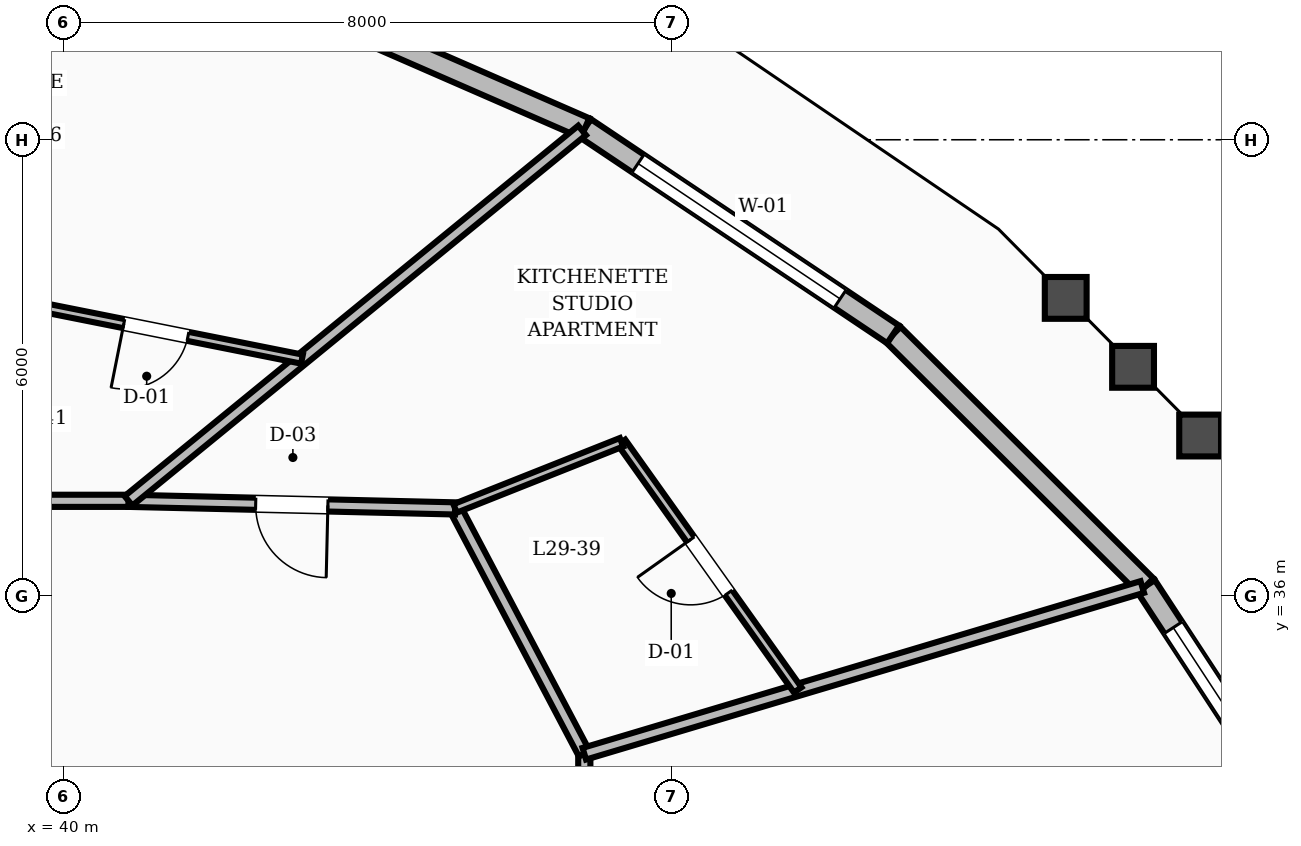
"""IFC4 building model, lengths in metres.
Left out: names, types, materials, properties, quantities, classifications, styles, units other than length and angle.
Written with IfcOpenShell. Run it as: python <this file> out.ifc"""

import sys

from ifc_helpers import new_model, si_unit, direction, frame, frame_2d, origin, place, context, subcontext, project, spatial, rectangle, extrude, element, fill, save


model = new_model("IFC4")
c1 = context("Model", 3, precision=1e-05, world=origin(), true_north=direction((0.0, 1.0)))
c2 = subcontext(c1, "Body", "Model", "MODEL_VIEW")
j1 = project(units=[si_unit("LENGTHUNIT", "METRE"), si_unit("PLANEANGLEUNIT", "RADIAN")], contexts=[c1])
p1 = place(None, origin())
s1 = spatial("IfcSite", under=j1, at=p1, CompositionType="ELEMENT")
p2 = place(p1, origin())
s2 = spatial("IfcBuilding", under=s1, at=p2, CompositionType="ELEMENT")
p3 = place(p2, frame((0.0, 0.0, 117.2)))
s3 = spatial("IfcBuildingStorey", under=s2, at=p3, CompositionType="ELEMENT", Elevation=117.2)
p4 = place(p3, frame((56.71, 32.356, 0.0), z_axis=(0.0, 0.0, 1.0), x_axis=(-0.547750773174, 0.836641554363, 0.0)))
e1 = element("IfcWall", 1, at=p4, inside=s3, PredefinedType="STANDARD", context=c2, shape_type="SweptSolid", body=[
    extrude(rectangle(XDim=4.512, YDim=0.28, at=frame_2d((2.256, 0.0))), origin(), (0.0, 0.0, 1.0), 2.82),
])
p5 = place(p4, frame((0.656, 0.0, 0.8)))
e2 = element("IfcOpeningElement", 2, at=p5, cuts=e1, PredefinedType="OPENING", context=c2, shape_type="SweptSolid", body=[
    extrude(rectangle(XDim=3.2, YDim=1.65, at=frame_2d((1.6, 0.825))), frame((0.0, 0.15, 0.0), z_axis=(0.0, -1.0, 0.0), x_axis=(1.0, 0.0, 0.0)), (0.0, 0.0, 1.0), 0.3),
])
p6 = place(p3, frame((54.239, 36.131, 0.0), z_axis=(0.0, 0.0, 1.0), x_axis=(-0.708977561681, 0.705231038052, 0.0)))
e3 = element("IfcWall", 3, at=p6, inside=s3, PredefinedType="STANDARD", context=c2, shape_type="SweptSolid", body=[
    extrude(rectangle(XDim=4.692, YDim=0.28, at=frame_2d((2.346, 0.0))), origin(), (0.0, 0.0, 1.0), 2.82),
])
p7 = place(p3, frame((50.913, 39.439, 0.0), z_axis=(0.0, 0.0, 1.0), x_axis=(-0.830785482437, 0.556592743549, 0.0)))
e4 = element("IfcWall", 4, at=p7, inside=s3, PredefinedType="STANDARD", context=c2, shape_type="SweptSolid", body=[
    extrude(rectangle(XDim=4.878, YDim=0.28, at=frame_2d((2.439, 0.0))), origin(), (0.0, 0.0, 1.0), 2.82),
])
p8 = place(p7, frame((0.839, 0.0, 0.8)))
e5 = element("IfcOpeningElement", 5, at=p8, cuts=e4, PredefinedType="OPENING", context=c2, shape_type="SweptSolid", body=[
    extrude(rectangle(XDim=3.2, YDim=1.65, at=frame_2d((1.6, 0.825))), frame((0.0, 0.15, 0.0), z_axis=(0.0, -1.0, 0.0), x_axis=(1.0, 0.0, 0.0)), (0.0, 0.0, 1.0), 0.3),
])
p9 = place(p3, frame((46.86, 42.155, 0.0), z_axis=(0.0, 0.0, 1.0), x_axis=(-0.916542280899, 0.39993780432, 0.0)))
e6 = element("IfcWall", 6, at=p9, inside=s3, PredefinedType="STANDARD", context=c2, shape_type="SweptSolid", body=[
    extrude(rectangle(XDim=5.045, YDim=0.28, at=frame_2d((2.523, 0.0))), origin(), (0.0, 0.0, 1.0), 2.82),
])
p10 = place(p3, frame((46.85, 30.151, 0.0), z_axis=(0.0, 0.0, 1.0), x_axis=(0.0, 1.0, 0.0)))
e7 = element("IfcWall", 7, at=p10, inside=s3, PredefinedType="SOLIDWALL", context=c2, shape_type="SweptSolid", body=[
    extrude(rectangle(XDim=3.771, YDim=0.16, at=frame_2d((1.886, 0.0))), origin(), (0.0, 0.0, 1.0), 2.8),
])
p11 = place(p10, frame((1.411, 0.0, 0.0)))
e8 = element("IfcOpeningElement", 8, at=p11, cuts=e7, PredefinedType="OPENING", context=c2, shape_type="SweptSolid", body=[
    extrude(rectangle(XDim=0.95, YDim=2.1, at=frame_2d((0.475, 1.05))), frame((0.0, 0.09, 0.0), z_axis=(0.0, -1.0, 0.0), x_axis=(1.0, 0.0, 0.0)), (0.0, 0.0, 1.0), 0.18),
])
p12 = place(p3, frame((46.85, 33.923, 0.0), z_axis=(0.0, 0.0, 1.0), x_axis=(-0.466093963429, 0.884735224378, 0.0)))
e9 = element("IfcWall", 9, at=p12, inside=s3, PredefinedType="SOLIDWALL", context=c2, shape_type="SweptSolid", body=[
    extrude(rectangle(XDim=3.648, YDim=0.16, at=frame_2d((1.824, 0.0))), origin(), (0.0, 0.0, 1.0), 2.8),
])
p13 = place(p3, frame((45.15, 37.15, 0.0), z_axis=(0.0, 0.0, 1.0), x_axis=(-0.999728709658, 0.023291781507, 0.0)))
e10 = element("IfcWall", 10, at=p13, inside=s3, PredefinedType="SOLIDWALL", context=c2, shape_type="SweptSolid", body=[
    extrude(rectangle(XDim=4.298, YDim=0.16, at=frame_2d((2.149, 0.0))), origin(), (0.0, 0.0, 1.0), 2.8),
])
p14 = place(p13, frame((1.674, 0.0, 0.0)))
e11 = element("IfcOpeningElement", 11, at=p14, cuts=e10, PredefinedType="OPENING", context=c2, shape_type="SweptSolid", body=[
    extrude(rectangle(XDim=0.95, YDim=2.1, at=frame_2d((0.475, 1.05))), frame((0.0, 0.09, 0.0), z_axis=(0.0, -1.0, 0.0), x_axis=(1.0, 0.0, 0.0)), (0.0, 0.0, 1.0), 0.18),
])
p15 = place(p3, frame((40.854, 37.25, 0.0), z_axis=(0.0, 0.0, 1.0), x_axis=(-1.0, 0.0, 0.0)))
e12 = element("IfcWall", 12, at=p15, inside=s3, PredefinedType="SOLIDWALL", context=c2, shape_type="SweptSolid", body=[
    extrude(rectangle(XDim=3.365, YDim=0.16, at=frame_2d((1.683, 0.0))), origin(), (0.0, 0.0, 1.0), 2.8),
])
p16 = place(p3, frame((46.85, 33.923, 0.0), z_axis=(0.0, 0.0, 1.0), x_axis=(0.958127454942, 0.286342068315, 0.0)))
e13 = element("IfcWall", 13, at=p16, inside=s3, PredefinedType="SOLIDWALL", context=c2, shape_type="SweptSolid", body=[
    extrude(rectangle(XDim=7.662, YDim=0.16, at=frame_2d((3.831, 0.0))), origin(), (0.0, 0.0, 1.0), 2.8),
])
p17 = place(p3, frame((49.658, 34.762, 0.0), z_axis=(0.0, 0.0, 1.0), x_axis=(-0.579666154862, 0.814854066019, 0.0)))
e14 = element("IfcWall", 14, at=p17, inside=s3, PredefinedType="PARTITIONING", context=c2, shape_type="SweptSolid", body=[
    extrude(rectangle(XDim=3.999, YDim=0.12, at=frame_2d((1.999, 0.0))), origin(), (0.0, 0.0, 1.0), 2.8),
])
p18 = place(p17, frame((1.569, 0.0, 0.0)))
e15 = element("IfcOpeningElement", 15, at=p18, cuts=e14, PredefinedType="OPENING", context=c2, shape_type="SweptSolid", body=[
    extrude(rectangle(XDim=0.86, YDim=2.1, at=frame_2d((0.43, 1.05))), frame((0.0, 0.07, 0.0), z_axis=(0.0, -1.0, 0.0), x_axis=(1.0, 0.0, 0.0)), (0.0, 0.0, 1.0), 0.14),
])
p19 = place(p3, frame((45.15, 37.15, 0.0), z_axis=(0.0, 0.0, 1.0), x_axis=(0.929331632403, 0.369246146921, 0.0)))
e16 = element("IfcWall", 16, at=p19, inside=s3, PredefinedType="PARTITIONING", context=c2, shape_type="SweptSolid", body=[
    extrude(rectangle(XDim=2.356, YDim=0.12, at=frame_2d((1.178, 0.0))), origin(), (0.0, 0.0, 1.0), 2.8),
])
p20 = place(p3, frame((40.854, 37.25, 0.0), z_axis=(0.0, 0.0, 1.0), x_axis=(0.774531610093, 0.632535204528, 0.0)))
e17 = element("IfcWall", 17, at=p20, inside=s3, PredefinedType="SOLIDWALL", context=c2, shape_type="SweptSolid", body=[
    extrude(rectangle(XDim=7.704, YDim=0.16, at=frame_2d((3.852, 0.0))), origin(), (0.0, 0.0, 1.0), 2.8),
])
p21 = place(p3, frame((43.136, 39.114, 0.0), z_axis=(0.0, 0.0, 1.0), x_axis=(-0.980671612986, 0.195660899218, 0.0)))
e18 = element("IfcWall", 18, at=p21, inside=s3, PredefinedType="PARTITIONING", context=c2, shape_type="SweptSolid", body=[
    extrude(rectangle(XDim=3.919, YDim=0.12, at=frame_2d((1.959, 0.0))), origin(), (0.0, 0.0, 1.0), 2.8),
])
p22 = place(p21, frame((1.53, 0.0, 0.0)))
e19 = element("IfcOpeningElement", 19, at=p22, cuts=e18, PredefinedType="OPENING", context=c2, shape_type="SweptSolid", body=[
    extrude(rectangle(XDim=0.86, YDim=2.1, at=frame_2d((0.43, 1.05))), frame((0.0, 0.07, 0.0), z_axis=(0.0, -1.0, 0.0), x_axis=(1.0, 0.0, 0.0)), (0.0, 0.0, 1.0), 0.14),
])
p23 = place(p5, origin())
e20 = element("IfcWindow", 20, at=p23, inside=s3, PartitioningType="SINGLE_PANEL", PredefinedType="WINDOW", context=c2, shape_type="SweptSolid", body=[
    extrude(rectangle(XDim=3.2, YDim=1.65, at=frame_2d((1.6, 0.825))), frame((0.0, 0.03, 0.0), z_axis=(0.0, -1.0, 0.0), x_axis=(1.0, 0.0, 0.0)), (0.0, 0.0, 1.0), 0.06),
])
fill(e2, e20)
p24 = place(p8, origin())
e21 = element("IfcWindow", 21, at=p24, inside=s3, PartitioningType="SINGLE_PANEL", PredefinedType="WINDOW", context=c2, shape_type="SweptSolid", body=[
    extrude(rectangle(XDim=3.2, YDim=1.65, at=frame_2d((1.6, 0.825))), frame((0.0, 0.03, 0.0), z_axis=(0.0, -1.0, 0.0), x_axis=(1.0, 0.0, 0.0)), (0.0, 0.0, 1.0), 0.06),
])
fill(e5, e21)
p25 = place(p18, origin())
e22 = element("IfcDoor", 22, at=p25, inside=s3, OperationType="SINGLE_SWING_RIGHT", PredefinedType="DOOR", context=c2, shape_type="SweptSolid", body=[
    extrude(rectangle(XDim=0.86, YDim=2.1, at=frame_2d((0.43, 1.05))), frame((0.0, 0.025, 0.0), z_axis=(0.0, -1.0, 0.0), x_axis=(1.0, 0.0, 0.0)), (0.0, 0.0, 1.0), 0.05),
])
fill(e15, e22)
p26 = place(p14, origin())
e23 = element("IfcDoor", 23, at=p26, inside=s3, OperationType="SINGLE_SWING_LEFT", PredefinedType="DOOR", context=c2, shape_type="SweptSolid", body=[
    extrude(rectangle(XDim=0.95, YDim=2.1, at=frame_2d((0.475, 1.05))), frame((0.0, 0.025, 0.0), z_axis=(0.0, -1.0, 0.0), x_axis=(1.0, 0.0, 0.0)), (0.0, 0.0, 1.0), 0.05),
])
fill(e11, e23)
p27 = place(p22, origin())
e24 = element("IfcDoor", 24, at=p27, inside=s3, OperationType="SINGLE_SWING_RIGHT", PredefinedType="DOOR", context=c2, shape_type="SweptSolid", body=[
    extrude(rectangle(XDim=0.86, YDim=2.1, at=frame_2d((0.43, 1.05))), frame((0.0, 0.025, 0.0), z_axis=(0.0, -1.0, 0.0), x_axis=(1.0, 0.0, 0.0)), (0.0, 0.0, 1.0), 0.05),
])
fill(e19, e24)
save(model, sys.argv[1])
